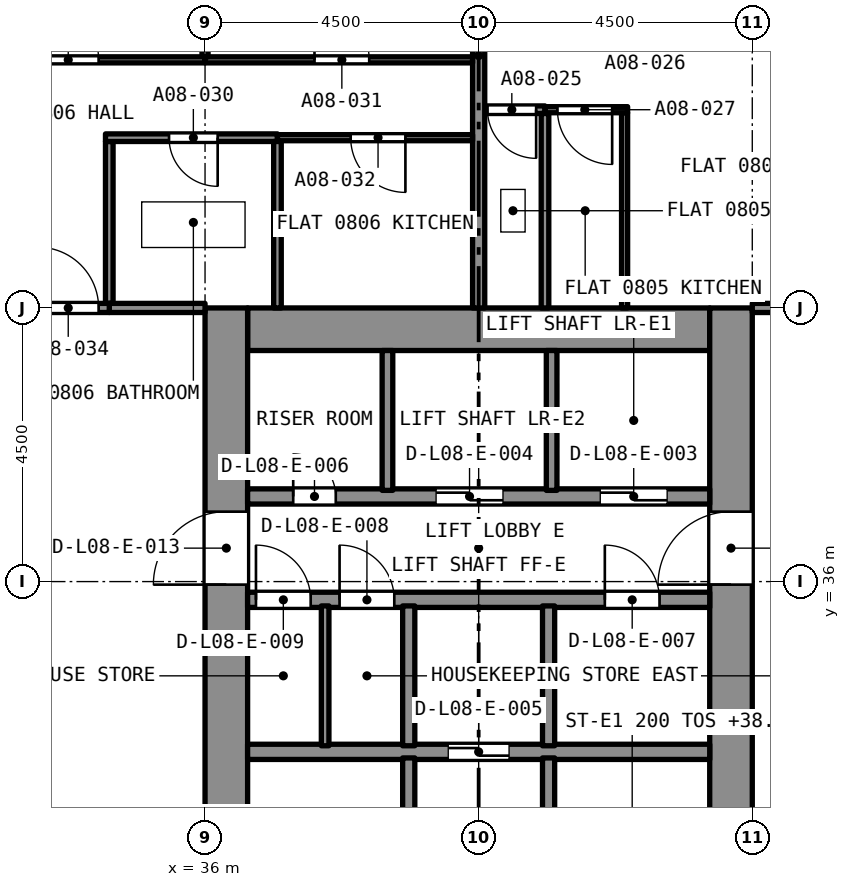
"""IFC4 building model, lengths in metres.
Left out: names, types, materials, properties, quantities, classifications, styles, units other than length and angle.
Written with IfcOpenShell. Run it as: python <this file> out.ifc"""

import sys

from ifc_helpers import new_model, si_unit, direction, frame, frame_2d, origin, place, context, subcontext, project, spatial, rectangle, extrude, element, fill, save


model = new_model("IFC4")
c1 = context("Model", 3, precision=1e-05, world=origin(), true_north=direction((0.0, 1.0)))
c2 = subcontext(c1, "Body", "Model", "MODEL_VIEW")
j1 = project(units=[si_unit("LENGTHUNIT", "METRE"), si_unit("PLANEANGLEUNIT", "RADIAN")], contexts=[c1])
p1 = place(None, origin())
s1 = spatial("IfcSite", under=j1, at=p1, CompositionType="ELEMENT")
p2 = place(p1, origin())
s2 = spatial("IfcBuilding", under=s1, at=p2, CompositionType="ELEMENT")
p3 = place(p2, frame((0.0, 0.0, 36.8)))
s3 = spatial("IfcBuildingStorey", under=s2, at=p3, CompositionType="ELEMENT", Elevation=36.8)
p4 = place(p3, frame((36.7, 40.15, 0.0), z_axis=(0.0, 0.0, 1.0), x_axis=(1.0, 0.0, 0.0)))
e1 = element("IfcWall", 1, at=p4, inside=s3, PredefinedType="SOLIDWALL", context=c2, shape_type="SweptSolid", body=[
    extrude(rectangle(XDim=7.6, YDim=0.7, at=frame_2d((3.8, 0.0))), origin(), (0.0, 0.0, 1.0), 3.2),
])
p5 = place(p3, frame((36.35, 27.0, 0.0), z_axis=(0.0, 0.0, 1.0), x_axis=(0.0, 1.0, 0.0)))
e2 = element("IfcWall", 2, at=p5, inside=s3, PredefinedType="SOLIDWALL", context=c2, shape_type="SweptSolid", body=[
    extrude(rectangle(XDim=13.5, YDim=0.7, at=frame_2d((6.75, 0.0))), origin(), (0.0, 0.0, 1.0), 3.2),
])
p6 = place(p5, frame((8.95, 0.0, 0.0)))
e3 = element("IfcOpeningElement", 3, at=p6, cuts=e2, PredefinedType="OPENING", context=c2, shape_type="SweptSolid", body=[
    extrude(rectangle(XDim=1.2, YDim=2.1, at=frame_2d((0.6, 1.05))), frame((0.0, 0.36, 0.0), z_axis=(0.0, -1.0, 0.0), x_axis=(1.0, 0.0, 0.0)), (0.0, 0.0, 1.0), 0.72),
])
p7 = place(p3, frame((44.65, 27.0, 0.0), z_axis=(0.0, 0.0, 1.0), x_axis=(0.0, 1.0, 0.0)))
e4 = element("IfcWall", 4, at=p7, inside=s3, PredefinedType="SOLIDWALL", context=c2, shape_type="SweptSolid", body=[
    extrude(rectangle(XDim=13.5, YDim=0.7, at=frame_2d((6.75, 0.0))), origin(), (0.0, 0.0, 1.0), 3.2),
])
p8 = place(p7, frame((8.95, 0.0, 0.0)))
e5 = element("IfcOpeningElement", 5, at=p8, cuts=e4, PredefinedType="OPENING", context=c2, shape_type="SweptSolid", body=[
    extrude(rectangle(XDim=1.2, YDim=2.1, at=frame_2d((0.6, 1.05))), frame((0.0, 0.36, 0.0), z_axis=(0.0, -1.0, 0.0), x_axis=(1.0, 0.0, 0.0)), (0.0, 0.0, 1.0), 0.72),
])
p9 = place(p3, frame((41.591, 43.76, 0.0), z_axis=(0.0, 0.0, 1.0), x_axis=(-1.0, 0.0, 0.0)))
e6 = element("IfcWall", 6, at=p9, inside=s3, PredefinedType="PARTITIONING", context=c2, shape_type="SweptSolid", body=[
    extrude(rectangle(XDim=0.991, YDim=0.125, at=frame_2d((0.495, 0.0))), origin(), (0.0, 0.0, 1.0), 2.9),
])
p10 = place(p9, frame((0.146, 0.0, 0.0)))
e7 = element("IfcOpeningElement", 7, at=p10, cuts=e6, PredefinedType="OPENING", context=c2, shape_type="SweptSolid", body=[
    extrude(rectangle(XDim=0.8, YDim=2.1, at=frame_2d((0.4, 1.05))), frame((0.0, 0.073, 0.0), z_axis=(0.0, -1.0, 0.0), x_axis=(1.0, 0.0, 0.0)), (0.0, 0.0, 1.0), 0.145),
])
p11 = place(p3, frame((41.591, 40.5, 0.0), z_axis=(0.0, 0.0, 1.0), x_axis=(0.0, 1.0, 0.0)))
e8 = element("IfcWall", 8, at=p11, inside=s3, PredefinedType="PARTITIONING", context=c2, shape_type="SweptSolid", body=[
    extrude(rectangle(XDim=3.198, YDim=0.125, at=frame_2d((1.599, 0.0))), origin(), (0.0, 0.0, 1.0), 2.9),
])
p12 = place(p3, frame((40.5, 40.5, 0.0), z_axis=(0.0, 0.0, 1.0), x_axis=(0.0, 1.0, 0.0)))
e9 = element("IfcWall", 9, at=p12, inside=s3, PredefinedType="PARTITIONING", context=c2, shape_type="SweptSolid", body=[
    extrude(rectangle(XDim=8.3, YDim=0.2, at=frame_2d((4.15, 0.0))), origin(), (0.0, 0.0, 1.0), 2.9),
])
p13 = place(p3, frame((42.9, 40.5, 0.0), z_axis=(0.0, 0.0, 1.0), x_axis=(0.0, 1.0, 0.0)))
e10 = element("IfcWall", 10, at=p13, inside=s3, PredefinedType="PARTITIONING", context=c2, shape_type="SweptSolid", body=[
    extrude(rectangle(XDim=3.21, YDim=0.1, at=frame_2d((1.605, 0.0))), origin(), (0.0, 0.0, 1.0), 2.9),
])
p14 = place(p3, frame((42.95, 43.76, 0.0), z_axis=(0.0, 0.0, 1.0), x_axis=(-1.0, 0.0, 0.0)))
e11 = element("IfcWall", 11, at=p14, inside=s3, PredefinedType="PARTITIONING", context=c2, shape_type="SweptSolid", body=[
    extrude(rectangle(XDim=1.359, YDim=0.1, at=frame_2d((0.68, 0.0))), origin(), (0.0, 0.0, 1.0), 2.9),
])
p15 = place(p14, frame((0.254, 0.0, 0.0)))
e12 = element("IfcOpeningElement", 12, at=p15, cuts=e11, PredefinedType="OPENING", context=c2, shape_type="SweptSolid", body=[
    extrude(rectangle(XDim=0.9, YDim=2.1, at=frame_2d((0.45, 1.05))), frame((0.0, 0.06, 0.0), z_axis=(0.0, -1.0, 0.0), x_axis=(1.0, 0.0, 0.0)), (0.0, 0.0, 1.0), 0.12),
])
p16 = place(p3, frame((45.0, 40.5, 0.0), z_axis=(0.0, 0.0, 1.0), x_axis=(1.0, 0.0, 0.0)))
e13 = element("IfcWall", 13, at=p16, inside=s3, PredefinedType="PARTITIONING", context=c2, shape_type="SweptSolid", body=[
    extrude(rectangle(XDim=3.8, YDim=0.15, at=frame_2d((1.9, 0.0))), origin(), (0.0, 0.0, 1.0), 2.9),
])
p17 = place(p16, frame((1.75, 0.0, 0.0)))
e14 = element("IfcOpeningElement", 14, at=p17, cuts=e13, PredefinedType="OPENING", context=c2, shape_type="SweptSolid", body=[
    extrude(rectangle(XDim=1.0, YDim=2.1, at=frame_2d((0.5, 1.05))), frame((0.0, 0.085, 0.0), z_axis=(0.0, -1.0, 0.0), x_axis=(1.0, 0.0, 0.0)), (0.0, 0.0, 1.0), 0.17),
])
p18 = place(p3, frame((34.425, 40.575, 0.0), z_axis=(0.0, 0.0, 1.0), x_axis=(0.0, 1.0, 0.0)))
e15 = element("IfcWall", 15, at=p18, inside=s3, PredefinedType="PARTITIONING", context=c2, shape_type="SweptSolid", body=[
    extrude(rectangle(XDim=2.663, YDim=0.125, at=frame_2d((1.331, 0.0))), origin(), (0.0, 0.0, 1.0), 2.9),
])
p19 = place(p3, frame((37.19, 43.3, 0.0), z_axis=(0.0, 0.0, 1.0), x_axis=(-1.0, 0.0, 0.0)))
e16 = element("IfcWall", 16, at=p19, inside=s3, PredefinedType="PARTITIONING", context=c2, shape_type="SweptSolid", body=[
    extrude(rectangle(XDim=2.828, YDim=0.125, at=frame_2d((1.414, 0.0))), origin(), (0.0, 0.0, 1.0), 2.9),
])
p20 = place(p19, frame((0.983, 0.0, 0.0)))
e17 = element("IfcOpeningElement", 17, at=p20, cuts=e16, PredefinedType="OPENING", context=c2, shape_type="SweptSolid", body=[
    extrude(rectangle(XDim=0.8, YDim=2.1, at=frame_2d((0.4, 1.05))), frame((0.0, 0.073, 0.0), z_axis=(0.0, -1.0, 0.0), x_axis=(1.0, 0.0, 0.0)), (0.0, 0.0, 1.0), 0.145),
])
p21 = place(p3, frame((37.191, 40.5, 0.0), z_axis=(0.0, 0.0, 1.0), x_axis=(0.0, 1.0, 0.0)))
e18 = element("IfcWall", 18, at=p21, inside=s3, PredefinedType="PARTITIONING", context=c2, shape_type="SweptSolid", body=[
    extrude(rectangle(XDim=2.738, YDim=0.125, at=frame_2d((1.369, 0.0))), origin(), (0.0, 0.0, 1.0), 2.9),
])
p22 = place(p3, frame((34.425, 40.5, 0.0), z_axis=(0.0, 0.0, 1.0), x_axis=(1.0, 0.0, 0.0)))
e19 = element("IfcWall", 19, at=p22, inside=s3, PredefinedType="PARTITIONING", context=c2, shape_type="SweptSolid", body=[
    extrude(rectangle(XDim=1.575, YDim=0.15, at=frame_2d((0.788, 0.0))), origin(), (0.0, 0.0, 1.0), 2.9),
])
p23 = place(p3, frame((36.0, 44.58, 0.0), z_axis=(0.0, 0.0, 1.0), x_axis=(1.0, 0.0, 0.0)))
e20 = element("IfcWall", 20, at=p23, inside=s3, PredefinedType="PARTITIONING", context=c2, shape_type="SweptSolid", body=[
    extrude(rectangle(XDim=4.4, YDim=0.1, at=frame_2d((2.2, 0.0))), origin(), (0.0, 0.0, 1.0), 2.9),
])
p24 = place(p23, frame((1.8, 0.0, 0.0)))
e21 = element("IfcOpeningElement", 21, at=p24, cuts=e20, PredefinedType="OPENING", context=c2, shape_type="SweptSolid", body=[
    extrude(rectangle(XDim=0.9, YDim=2.1, at=frame_2d((0.45, 1.05))), frame((0.0, 0.06, 0.0), z_axis=(0.0, -1.0, 0.0), x_axis=(1.0, 0.0, 0.0)), (0.0, 0.0, 1.0), 0.12),
])
p25 = place(p3, frame((36.0, 44.63, 0.0), z_axis=(0.0, 0.0, 1.0), x_axis=(0.0, 1.0, 0.0)))
e22 = element("IfcWall", 22, at=p25, inside=s3, PredefinedType="PARTITIONING", context=c2, shape_type="SweptSolid", body=[
    extrude(rectangle(XDim=4.17, YDim=0.1, at=frame_2d((2.085, 0.0))), origin(), (0.0, 0.0, 1.0), 2.9),
])
p26 = place(p3, frame((40.4, 43.3, 0.0), z_axis=(0.0, 0.0, 1.0), x_axis=(-1.0, 0.0, 0.0)))
e23 = element("IfcWall", 23, at=p26, inside=s3, PredefinedType="PARTITIONING", context=c2, shape_type="SweptSolid", body=[
    extrude(rectangle(XDim=3.209, YDim=0.1, at=frame_2d((1.605, 0.0))), origin(), (0.0, 0.0, 1.0), 2.9),
])
p27 = place(p26, frame((1.105, 0.0, 0.0)))
e24 = element("IfcOpeningElement", 24, at=p27, cuts=e23, PredefinedType="OPENING", context=c2, shape_type="SweptSolid", body=[
    extrude(rectangle(XDim=0.9, YDim=2.1, at=frame_2d((0.45, 1.05))), frame((0.0, 0.06, 0.0), z_axis=(0.0, -1.0, 0.0), x_axis=(1.0, 0.0, 0.0)), (0.0, 0.0, 1.0), 0.12),
])
p28 = place(p3, frame((32.2, 44.58, 0.0), z_axis=(0.0, 0.0, 1.0), x_axis=(1.0, 0.0, 0.0)))
e25 = element("IfcWall", 25, at=p28, inside=s3, PredefinedType="PARTITIONING", context=c2, shape_type="SweptSolid", body=[
    extrude(rectangle(XDim=3.8, YDim=0.1, at=frame_2d((1.9, 0.0))), origin(), (0.0, 0.0, 1.0), 2.9),
])
p29 = place(p28, frame((1.05, 0.0, 0.0)))
e26 = element("IfcOpeningElement", 26, at=p29, cuts=e25, PredefinedType="OPENING", context=c2, shape_type="SweptSolid", body=[
    extrude(rectangle(XDim=1.0, YDim=2.1, at=frame_2d((0.5, 1.05))), frame((0.0, 0.06, 0.0), z_axis=(0.0, -1.0, 0.0), x_axis=(1.0, 0.0, 0.0)), (0.0, 0.0, 1.0), 0.12),
])
p30 = place(p3, frame((32.2, 40.5, 0.0), z_axis=(0.0, 0.0, 1.0), x_axis=(1.0, 0.0, 0.0)))
e27 = element("IfcWall", 27, at=p30, inside=s3, PredefinedType="PARTITIONING", context=c2, shape_type="SweptSolid", body=[
    extrude(rectangle(XDim=2.225, YDim=0.15, at=frame_2d((1.113, 0.0))), origin(), (0.0, 0.0, 1.0), 2.9),
])
p31 = place(p30, frame((1.05, 0.0, 0.0)))
e28 = element("IfcOpeningElement", 28, at=p31, cuts=e27, PredefinedType="OPENING", context=c2, shape_type="SweptSolid", body=[
    extrude(rectangle(XDim=1.0, YDim=2.1, at=frame_2d((0.5, 1.05))), frame((0.0, 0.085, 0.0), z_axis=(0.0, -1.0, 0.0), x_axis=(1.0, 0.0, 0.0)), (0.0, 0.0, 1.0), 0.17),
])
p32 = place(p3, frame((36.7, 33.2, 0.0), z_axis=(0.0, 0.0, 1.0), x_axis=(1.0, 0.0, 0.0)))
e29 = element("IfcWall", 29, at=p32, inside=s3, PredefinedType="SOLIDWALL", context=c2, shape_type="SweptSolid", body=[
    extrude(rectangle(XDim=7.6, YDim=0.25, at=frame_2d((3.8, 0.0))), origin(), (0.0, 0.0, 1.0), 2.9),
])
p33 = place(p32, frame((3.3, 0.0, 0.0)))
e30 = element("IfcOpeningElement", 30, at=p33, cuts=e29, PredefinedType="OPENING", context=c2, shape_type="SweptSolid", body=[
    extrude(rectangle(XDim=1.0, YDim=2.1, at=frame_2d((0.5, 1.05))), frame((0.0, 0.135, 0.0), z_axis=(0.0, -1.0, 0.0), x_axis=(1.0, 0.0, 0.0)), (0.0, 0.0, 1.0), 0.27),
])
p34 = place(p3, frame((36.7, 35.7, 0.0), z_axis=(0.0, 0.0, 1.0), x_axis=(1.0, 0.0, 0.0)))
e31 = element("IfcWall", 31, at=p34, inside=s3, PredefinedType="SOLIDWALL", context=c2, shape_type="SweptSolid", body=[
    extrude(rectangle(XDim=7.6, YDim=0.25, at=frame_2d((3.8, 0.0))), origin(), (0.0, 0.0, 1.0), 2.9),
])
p35 = place(p34, frame((5.875, 0.0, 0.0)))
e32 = element("IfcOpeningElement", 32, at=p35, cuts=e31, PredefinedType="OPENING", context=c2, shape_type="SweptSolid", body=[
    extrude(rectangle(XDim=0.9, YDim=2.1, at=frame_2d((0.45, 1.05))), frame((0.0, 0.135, 0.0), z_axis=(0.0, -1.0, 0.0), x_axis=(1.0, 0.0, 0.0)), (0.0, 0.0, 1.0), 0.27),
])
p36 = place(p34, frame((1.512, 0.0, 0.0)))
e33 = element("IfcOpeningElement", 33, at=p36, cuts=e31, PredefinedType="OPENING", context=c2, shape_type="SweptSolid", body=[
    extrude(rectangle(XDim=0.9, YDim=2.1, at=frame_2d((0.45, 1.05))), frame((0.0, 0.135, 0.0), z_axis=(0.0, -1.0, 0.0), x_axis=(1.0, 0.0, 0.0)), (0.0, 0.0, 1.0), 0.27),
])
p37 = place(p34, frame((0.137, 0.0, 0.0)))
e34 = element("IfcOpeningElement", 34, at=p37, cuts=e31, PredefinedType="OPENING", context=c2, shape_type="SweptSolid", body=[
    extrude(rectangle(XDim=0.9, YDim=2.1, at=frame_2d((0.45, 1.05))), frame((0.0, 0.135, 0.0), z_axis=(0.0, -1.0, 0.0), x_axis=(1.0, 0.0, 0.0)), (0.0, 0.0, 1.0), 0.27),
])
p38 = place(p3, frame((36.7, 37.4, 0.0), z_axis=(0.0, 0.0, 1.0), x_axis=(1.0, 0.0, 0.0)))
e35 = element("IfcWall", 35, at=p38, inside=s3, PredefinedType="SOLIDWALL", context=c2, shape_type="SweptSolid", body=[
    extrude(rectangle(XDim=7.6, YDim=0.25, at=frame_2d((3.8, 0.0))), origin(), (0.0, 0.0, 1.0), 2.9),
])
p39 = place(p38, frame((5.8, 0.0, 0.0)))
e36 = element("IfcOpeningElement", 36, at=p39, cuts=e35, PredefinedType="OPENING", context=c2, shape_type="SweptSolid", body=[
    extrude(rectangle(XDim=1.1, YDim=2.4, at=frame_2d((0.55, 1.2))), frame((0.0, 0.135, 0.0), z_axis=(0.0, -1.0, 0.0), x_axis=(1.0, 0.0, 0.0)), (0.0, 0.0, 1.0), 0.27),
])
p40 = place(p38, frame((3.1, 0.0, 0.0)))
e37 = element("IfcOpeningElement", 37, at=p40, cuts=e35, PredefinedType="OPENING", context=c2, shape_type="SweptSolid", body=[
    extrude(rectangle(XDim=1.1, YDim=2.4, at=frame_2d((0.55, 1.2))), frame((0.0, 0.135, 0.0), z_axis=(0.0, -1.0, 0.0), x_axis=(1.0, 0.0, 0.0)), (0.0, 0.0, 1.0), 0.27),
])
p41 = place(p38, frame((0.75, 0.0, 0.0)))
e38 = element("IfcOpeningElement", 38, at=p41, cuts=e35, PredefinedType="OPENING", context=c2, shape_type="SweptSolid", body=[
    extrude(rectangle(XDim=0.7, YDim=2.1, at=frame_2d((0.35, 1.05))), frame((0.0, 0.135, 0.0), z_axis=(0.0, -1.0, 0.0), x_axis=(1.0, 0.0, 0.0)), (0.0, 0.0, 1.0), 0.27),
])
p42 = place(p3, frame((41.65, 27.7, 0.0), z_axis=(0.0, 0.0, 1.0), x_axis=(0.0, 1.0, 0.0)))
e39 = element("IfcWall", 39, at=p42, inside=s3, PredefinedType="SOLIDWALL", context=c2, shape_type="SweptSolid", body=[
    extrude(rectangle(XDim=5.4, YDim=0.2, at=frame_2d((2.7, 0.0))), origin(), (0.0, 0.0, 1.0), 2.9),
])
p43 = place(p42, frame((0.2, 0.0, 0.0)))
e40 = element("IfcOpeningElement", 40, at=p43, cuts=e39, PredefinedType="OPENING", context=c2, shape_type="SweptSolid", body=[
    extrude(rectangle(XDim=0.9, YDim=2.1, at=frame_2d((0.45, 1.05))), frame((0.0, 0.11, 0.0), z_axis=(0.0, -1.0, 0.0), x_axis=(1.0, 0.0, 0.0)), (0.0, 0.0, 1.0), 0.22),
])
p44 = place(p3, frame((39.35, 27.7, 0.0), z_axis=(0.0, 0.0, 1.0), x_axis=(0.0, 1.0, 0.0)))
e41 = element("IfcWall", 41, at=p44, inside=s3, PredefinedType="SOLIDWALL", context=c2, shape_type="SweptSolid", body=[
    extrude(rectangle(XDim=5.4, YDim=0.2, at=frame_2d((2.7, 0.0))), origin(), (0.0, 0.0, 1.0), 2.9),
])
p45 = place(p44, frame((0.2, 0.0, 0.0)))
e42 = element("IfcOpeningElement", 42, at=p45, cuts=e41, PredefinedType="OPENING", context=c2, shape_type="SweptSolid", body=[
    extrude(rectangle(XDim=0.9, YDim=2.1, at=frame_2d((0.45, 1.05))), frame((0.0, 0.11, 0.0), z_axis=(0.0, -1.0, 0.0), x_axis=(1.0, 0.0, 0.0)), (0.0, 0.0, 1.0), 0.22),
])
for number, where, z_axis, x_axis in (
    (43, (41.65, 33.3, 0.0), (0.0, 0.0, 1.0), (0.0, 1.0, 0.0)),
    (44, (39.35, 33.3, 0.0), (0.0, 0.0, 1.0), (0.0, 1.0, 0.0)),
):
    element("IfcWall", number, at=place(p3, frame(where, z_axis=z_axis, x_axis=x_axis)), inside=s3, PredefinedType="SOLIDWALL", context=c2, shape_type="SweptSolid", body=[
        extrude(rectangle(XDim=2.3, YDim=0.2, at=frame_2d((1.15, 0.0))), origin(), (0.0, 0.0, 1.0), 2.9),
    ])
for number, where, z_axis, x_axis in (
    (45, (41.7, 37.5, 0.0), (0.0, 0.0, 1.0), (0.0, 1.0, 0.0)),
    (46, (39.0, 37.5, 0.0), (0.0, 0.0, 1.0), (0.0, 1.0, 0.0)),
):
    element("IfcWall", number, at=place(p3, frame(where, z_axis=z_axis, x_axis=x_axis)), inside=s3, PredefinedType="SOLIDWALL", context=c2, shape_type="SweptSolid", body=[
        extrude(rectangle(XDim=2.3, YDim=0.175, at=frame_2d((1.15, 0.0))), origin(), (0.0, 0.0, 1.0), 2.9),
    ])
p46 = place(p3, frame((37.975, 33.3, 0.0), z_axis=(0.0, 0.0, 1.0), x_axis=(0.0, 1.0, 0.0)))
e47 = element("IfcWall", 47, at=p46, inside=s3, PredefinedType="PARTITIONING", context=c2, shape_type="SweptSolid", body=[
    extrude(rectangle(XDim=2.3, YDim=0.125, at=frame_2d((1.15, 0.0))), origin(), (0.0, 0.0, 1.0), 2.9),
])
p47 = place(p10, origin())
e48 = element("IfcDoor", 48, at=p47, inside=s3, OperationType="SINGLE_SWING_RIGHT", PredefinedType="DOOR", context=c2, shape_type="SweptSolid", body=[
    extrude(rectangle(XDim=0.8, YDim=2.1, at=frame_2d((0.4, 1.05))), frame((0.0, 0.025, 0.0), z_axis=(0.0, -1.0, 0.0), x_axis=(1.0, 0.0, 0.0)), (0.0, 0.0, 1.0), 0.05),
])
fill(e7, e48)
p48 = place(p15, origin())
e49 = element("IfcDoor", 49, at=p48, inside=s3, OperationType="SINGLE_SWING_RIGHT", PredefinedType="DOOR", context=c2, shape_type="SweptSolid", body=[
    extrude(rectangle(XDim=0.9, YDim=2.1, at=frame_2d((0.45, 1.05))), frame((0.0, 0.025, 0.0), z_axis=(0.0, -1.0, 0.0), x_axis=(1.0, 0.0, 0.0)), (0.0, 0.0, 1.0), 0.05),
])
fill(e12, e49)
p49 = place(p20, origin())
e50 = element("IfcDoor", 50, at=p49, inside=s3, OperationType="SINGLE_SWING_LEFT", PredefinedType="DOOR", context=c2, shape_type="SweptSolid", body=[
    extrude(rectangle(XDim=0.8, YDim=2.1, at=frame_2d((0.4, 1.05))), frame((0.0, 0.025, 0.0), z_axis=(0.0, -1.0, 0.0), x_axis=(1.0, 0.0, 0.0)), (0.0, 0.0, 1.0), 0.05),
])
fill(e17, e50)
p50 = place(p24, origin())
e51 = element("IfcDoor", 51, at=p50, inside=s3, OperationType="SINGLE_SWING_RIGHT", PredefinedType="DOOR", context=c2, shape_type="SweptSolid", body=[
    extrude(rectangle(XDim=0.9, YDim=2.1, at=frame_2d((0.45, 1.05))), frame((0.0, 0.025, 0.0), z_axis=(0.0, -1.0, 0.0), x_axis=(1.0, 0.0, 0.0)), (0.0, 0.0, 1.0), 0.05),
])
fill(e21, e51)
p51 = place(p27, origin())
e52 = element("IfcDoor", 52, at=p51, inside=s3, OperationType="SINGLE_SWING_LEFT", PredefinedType="DOOR", context=c2, shape_type="SweptSolid", body=[
    extrude(rectangle(XDim=0.9, YDim=2.1, at=frame_2d((0.45, 1.05))), frame((0.0, 0.025, 0.0), z_axis=(0.0, -1.0, 0.0), x_axis=(1.0, 0.0, 0.0)), (0.0, 0.0, 1.0), 0.05),
])
fill(e24, e52)
p52 = place(p29, origin())
e53 = element("IfcDoor", 53, at=p52, inside=s3, OperationType="SINGLE_SWING_LEFT", PredefinedType="DOOR", context=c2, shape_type="SweptSolid", body=[
    extrude(rectangle(XDim=1.0, YDim=2.1, at=frame_2d((0.5, 1.05))), frame((0.0, 0.025, 0.0), z_axis=(0.0, -1.0, 0.0), x_axis=(1.0, 0.0, 0.0)), (0.0, 0.0, 1.0), 0.05),
])
fill(e26, e53)
p53 = place(p31, origin())
e54 = element("IfcDoor", 54, at=p53, inside=s3, OperationType="SINGLE_SWING_RIGHT", PredefinedType="DOOR", context=c2, shape_type="SweptSolid", body=[
    extrude(rectangle(XDim=1.0, YDim=2.1, at=frame_2d((0.5, 1.05))), frame((0.0, 0.025, 0.0), z_axis=(0.0, -1.0, 0.0), x_axis=(1.0, 0.0, 0.0)), (0.0, 0.0, 1.0), 0.05),
])
fill(e28, e54)
p54 = place(p39, origin())
e55 = element("IfcDoor", 55, at=p54, inside=s3, OperationType="SLIDING_TO_LEFT", PredefinedType="DOOR", context=c2, shape_type="SweptSolid", body=[
    extrude(rectangle(XDim=1.1, YDim=2.4, at=frame_2d((0.55, 1.2))), frame((0.0, 0.025, 0.0), z_axis=(0.0, -1.0, 0.0), x_axis=(1.0, 0.0, 0.0)), (0.0, 0.0, 1.0), 0.05),
])
fill(e36, e55)
p55 = place(p40, origin())
e56 = element("IfcDoor", 56, at=p55, inside=s3, OperationType="SLIDING_TO_LEFT", PredefinedType="DOOR", context=c2, shape_type="SweptSolid", body=[
    extrude(rectangle(XDim=1.1, YDim=2.4, at=frame_2d((0.55, 1.2))), frame((0.0, 0.025, 0.0), z_axis=(0.0, -1.0, 0.0), x_axis=(1.0, 0.0, 0.0)), (0.0, 0.0, 1.0), 0.05),
])
fill(e37, e56)
p56 = place(p33, origin())
e57 = element("IfcDoor", 57, at=p56, inside=s3, OperationType="SLIDING_TO_LEFT", PredefinedType="DOOR", context=c2, shape_type="SweptSolid", body=[
    extrude(rectangle(XDim=1.0, YDim=2.1, at=frame_2d((0.5, 1.05))), frame((0.0, 0.025, 0.0), z_axis=(0.0, -1.0, 0.0), x_axis=(1.0, 0.0, 0.0)), (0.0, 0.0, 1.0), 0.05),
])
fill(e30, e57)
p57 = place(p41, origin())
e58 = element("IfcDoor", 58, at=p57, inside=s3, OperationType="SINGLE_SWING_LEFT", PredefinedType="DOOR", context=c2, shape_type="SweptSolid", body=[
    extrude(rectangle(XDim=0.7, YDim=2.1, at=frame_2d((0.35, 1.05))), frame((0.0, 0.025, 0.0), z_axis=(0.0, -1.0, 0.0), x_axis=(1.0, 0.0, 0.0)), (0.0, 0.0, 1.0), 0.05),
])
fill(e38, e58)
p58 = place(p35, origin())
e59 = element("IfcDoor", 59, at=p58, inside=s3, OperationType="SINGLE_SWING_LEFT", PredefinedType="DOOR", context=c2, shape_type="SweptSolid", body=[
    extrude(rectangle(XDim=0.9, YDim=2.1, at=frame_2d((0.45, 1.05))), frame((0.0, 0.025, 0.0), z_axis=(0.0, -1.0, 0.0), x_axis=(1.0, 0.0, 0.0)), (0.0, 0.0, 1.0), 0.05),
])
fill(e32, e59)
p59 = place(p36, origin())
e60 = element("IfcDoor", 60, at=p59, inside=s3, OperationType="SINGLE_SWING_LEFT", PredefinedType="DOOR", context=c2, shape_type="SweptSolid", body=[
    extrude(rectangle(XDim=0.9, YDim=2.1, at=frame_2d((0.45, 1.05))), frame((0.0, 0.025, 0.0), z_axis=(0.0, -1.0, 0.0), x_axis=(1.0, 0.0, 0.0)), (0.0, 0.0, 1.0), 0.05),
])
fill(e33, e60)
p60 = place(p37, origin())
e61 = element("IfcDoor", 61, at=p60, inside=s3, OperationType="SINGLE_SWING_LEFT", PredefinedType="DOOR", context=c2, shape_type="SweptSolid", body=[
    extrude(rectangle(XDim=0.9, YDim=2.1, at=frame_2d((0.45, 1.05))), frame((0.0, 0.025, 0.0), z_axis=(0.0, -1.0, 0.0), x_axis=(1.0, 0.0, 0.0)), (0.0, 0.0, 1.0), 0.05),
])
fill(e34, e61)
p61 = place(p6, origin())
e62 = element("IfcDoor", 62, at=p61, inside=s3, OperationType="SINGLE_SWING_LEFT", PredefinedType="DOOR", context=c2, shape_type="SweptSolid", body=[
    extrude(rectangle(XDim=1.2, YDim=2.1, at=frame_2d((0.6, 1.05))), frame((0.0, 0.025, 0.0), z_axis=(0.0, -1.0, 0.0), x_axis=(1.0, 0.0, 0.0)), (0.0, 0.0, 1.0), 0.05),
])
fill(e3, e62)
p62 = place(p8, origin())
e63 = element("IfcDoor", 63, at=p62, inside=s3, OperationType="SINGLE_SWING_LEFT", PredefinedType="DOOR", context=c2, shape_type="SweptSolid", body=[
    extrude(rectangle(XDim=1.2, YDim=2.1, at=frame_2d((0.6, 1.05))), frame((0.0, 0.025, 0.0), z_axis=(0.0, -1.0, 0.0), x_axis=(1.0, 0.0, 0.0)), (0.0, 0.0, 1.0), 0.05),
])
fill(e5, e63)
save(model, sys.argv[1])
